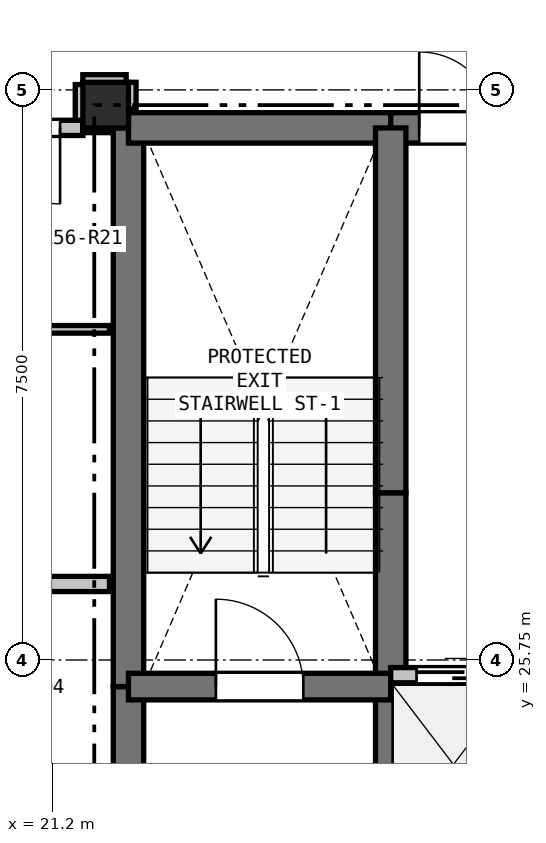
"""IFC4 building model, lengths in metres.
Left out: names, types, materials, properties, quantities, classifications, styles, units other than length and angle.
Written with IfcOpenShell. Run it as: python <this file> out.ifc"""

import sys

from ifc_helpers import new_model, si_unit, direction, frame, frame_2d, origin, origin_2d, place, context, subcontext, project, spatial, rectangle, extrude, element, fill, save


model = new_model("IFC4")
c1 = context("Model", 3, precision=1e-05, world=origin(), true_north=direction((0.0, 1.0)))
c2 = subcontext(c1, "Body", "Model", "MODEL_VIEW")
j1 = project(units=[si_unit("LENGTHUNIT", "METRE"), si_unit("PLANEANGLEUNIT", "RADIAN")], contexts=[c1])
p1 = place(None, origin())
s1 = spatial("IfcSite", under=j1, at=p1, CompositionType="ELEMENT")
p2 = place(p1, origin())
s2 = spatial("IfcBuilding", under=s1, at=p2, CompositionType="ELEMENT")
p3 = place(p2, frame((0.0, 0.0, 201.9)))
s3 = spatial("IfcBuildingStorey", under=s2, at=p3, CompositionType="ELEMENT", Elevation=201.9)
p4 = place(p3, frame((21.9, 33.05, 0.0), z_axis=(0.0, 0.0, 1.0), x_axis=(1.0, 0.0, 0.0)))
e1 = element("IfcColumn", 1, at=p4, inside=s3, PredefinedType="COLUMN", context=c2, shape_type="SweptSolid", body=[
    extrude(rectangle(XDim=0.6, YDim=0.6, at=origin_2d()), origin(), (0.0, 0.0, 1.0), 3.3),
])
p5 = place(p3, frame((22.2, 20.75, 0.0), z_axis=(0.0, 0.0, 1.0), x_axis=(0.0, 1.0, 0.0)))
e2 = element("IfcWall", 2, at=p5, inside=s3, PredefinedType="SHEAR", context=c2, shape_type="SweptSolid", body=[
    extrude(rectangle(XDim=4.65, YDim=0.4, at=frame_2d((2.325, 0.0))), origin(), (0.0, 0.0, 1.0), 3.07),
])
p6 = place(p3, frame((22.2, 25.4, 0.0), z_axis=(0.0, 0.0, 1.0), x_axis=(0.0, 1.0, 0.0)))
e3 = element("IfcWall", 3, at=p6, inside=s3, PredefinedType="SHEAR", context=c2, shape_type="SweptSolid", body=[
    extrude(rectangle(XDim=7.35, YDim=0.4, at=frame_2d((3.675, 0.0))), origin(), (0.0, 0.0, 1.0), 3.07),
])
p7 = place(p3, frame((22.2, 32.75, 0.0), z_axis=(0.0, 0.0, 1.0), x_axis=(1.0, 0.0, 0.0)))
e4 = element("IfcWall", 4, at=p7, inside=s3, PredefinedType="SHEAR", context=c2, shape_type="SweptSolid", body=[
    extrude(rectangle(XDim=3.45, YDim=0.4, at=frame_2d((1.725, 0.0))), origin(), (0.0, 0.0, 1.0), 3.07),
])
p8 = place(p3, frame((25.65, 32.75, 0.0), z_axis=(0.0, 0.0, 1.0), x_axis=(1.0, 0.0, 0.0)))
e5 = element("IfcWall", 5, at=p8, inside=s3, PredefinedType="SHEAR", context=c2, shape_type="SweptSolid", body=[
    extrude(rectangle(XDim=1.75, YDim=0.4, at=frame_2d((0.875, 0.0))), origin(), (0.0, 0.0, 1.0), 3.07),
])
p9 = place(p8, frame((0.375, 0.0, 0.0)))
e6 = element("IfcOpeningElement", 6, at=p9, cuts=e5, PredefinedType="OPENING", context=c2, shape_type="SweptSolid", body=[
    extrude(rectangle(XDim=1.0, YDim=2.15, at=frame_2d((0.5, 1.075))), frame((0.0, 0.21, 0.0), z_axis=(0.0, -1.0, 0.0), x_axis=(1.0, 0.0, 0.0)), (0.0, 0.0, 1.0), 0.42),
])
p10 = place(p3, frame((25.65, 22.75, 0.0), z_axis=(0.0, 0.0, 1.0), x_axis=(0.0, 1.0, 0.0)))
e7 = element("IfcWall", 7, at=p10, inside=s3, PredefinedType="SHEAR", context=c2, shape_type="SweptSolid", body=[
    extrude(rectangle(XDim=2.8, YDim=0.4, at=frame_2d((1.4, 0.0))), origin(), (0.0, 0.0, 1.0), 3.07),
])
p11 = place(p3, frame((25.65, 25.55, 0.0), z_axis=(0.0, 0.0, 1.0), x_axis=(0.0, 1.0, 0.0)))
e8 = element("IfcWall", 8, at=p11, inside=s3, PredefinedType="SHEAR", context=c2, shape_type="SweptSolid", body=[
    extrude(rectangle(XDim=2.4, YDim=0.4, at=frame_2d((1.2, 0.0))), origin(), (0.0, 0.0, 1.0), 3.07),
])
p12 = place(p3, frame((25.65, 27.95, 0.0), z_axis=(0.0, 0.0, 1.0), x_axis=(0.0, 1.0, 0.0)))
e9 = element("IfcWall", 9, at=p12, inside=s3, PredefinedType="SHEAR", context=c2, shape_type="SweptSolid", body=[
    extrude(rectangle(XDim=4.8, YDim=0.4, at=frame_2d((2.4, 0.0))), origin(), (0.0, 0.0, 1.0), 3.07),
])
p13 = place(p3, frame((22.2, 25.4, 0.0), z_axis=(0.0, 0.0, 1.0), x_axis=(1.0, 0.0, 0.0)))
e10 = element("IfcWall", 10, at=p13, inside=s3, PredefinedType="SHEAR", context=c2, shape_type="SweptSolid", body=[
    extrude(rectangle(XDim=3.45, YDim=0.35, at=frame_2d((1.725, 0.0))), origin(), (0.0, 0.0, 1.0), 3.07),
])
p14 = place(p13, frame((1.15, 0.0, 0.0)))
e11 = element("IfcOpeningElement", 11, at=p14, cuts=e10, PredefinedType="OPENING", context=c2, shape_type="SweptSolid", body=[
    extrude(rectangle(XDim=1.15, YDim=2.15, at=frame_2d((0.575, 1.075))), frame((0.0, 0.185, 0.0), z_axis=(0.0, -1.0, 0.0), x_axis=(1.0, 0.0, 0.0)), (0.0, 0.0, 1.0), 0.37),
])
p15 = place(p3, frame((25.65, 25.55, 0.0), z_axis=(0.0, 0.0, 1.0), x_axis=(1.0, 0.0, 0.0)))
e12 = element("IfcWall", 12, at=p15, inside=s3, PredefinedType="PARTITIONING", context=c2, shape_type="SweptSolid", body=[
    extrude(rectangle(XDim=4.95, YDim=0.2, at=frame_2d((2.475, 0.0))), origin(), (0.0, 0.0, 1.0), 3.07),
])
p16 = place(p15, frame((0.34, 0.0, 0.0)))
e13 = element("IfcOpeningElement", 13, at=p16, cuts=e12, PredefinedType="OPENING", context=c2, shape_type="SweptSolid", body=[
    extrude(rectangle(XDim=1.1, YDim=2.15, at=frame_2d((0.55, 1.075))), frame((0.0, 0.11, 0.0), z_axis=(0.0, -1.0, 0.0), x_axis=(1.0, 0.0, 0.0)), (0.0, 0.0, 1.0), 0.22),
])
p17 = place(p15, frame((1.99, 0.0, 0.0)))
e14 = element("IfcOpeningElement", 14, at=p17, cuts=e12, PredefinedType="OPENING", context=c2, shape_type="SweptSolid", body=[
    extrude(rectangle(XDim=1.1, YDim=2.15, at=frame_2d((0.55, 1.075))), frame((0.0, 0.11, 0.0), z_axis=(0.0, -1.0, 0.0), x_axis=(1.0, 0.0, 0.0)), (0.0, 0.0, 1.0), 0.22),
])
p18 = place(p15, frame((3.64, 0.0, 0.0)))
e15 = element("IfcOpeningElement", 15, at=p18, cuts=e12, PredefinedType="OPENING", context=c2, shape_type="SweptSolid", body=[
    extrude(rectangle(XDim=1.1, YDim=2.15, at=frame_2d((0.55, 1.075))), frame((0.0, 0.11, 0.0), z_axis=(0.0, -1.0, 0.0), x_axis=(1.0, 0.0, 0.0)), (0.0, 0.0, 1.0), 0.22),
])
p19 = place(p3, frame((22.2, 33.0, 0.0), z_axis=(0.0, 0.0, 1.0), x_axis=(0.0, 1.0, 0.0)))
e16 = element("IfcWall", 16, at=p19, inside=s3, PredefinedType="PARTITIONING", context=c2, shape_type="SweptSolid", body=[
    extrude(rectangle(XDim=0.35, YDim=0.2, at=frame_2d((0.175, 0.0))), origin(), (0.0, 0.0, 1.0), 2.595),
])
p20 = place(p3, frame((22.17, 33.35, 0.0), z_axis=(0.0, 0.0, 1.0), x_axis=(-1.0, 0.0, 0.0)))
e17 = element("IfcWall", 17, at=p20, inside=s3, PredefinedType="PARTITIONING", context=c2, shape_type="SweptSolid", body=[
    extrude(rectangle(XDim=0.57, YDim=0.2, at=frame_2d((0.285, 0.0))), origin(), (0.0, 0.0, 1.0), 3.07),
])
p21 = place(p3, frame((21.6, 33.32, 0.0), z_axis=(0.0, 0.0, 1.0), x_axis=(0.0, -1.0, 0.0)))
e18 = element("IfcWall", 18, at=p21, inside=s3, PredefinedType="PARTITIONING", context=c2, shape_type="SweptSolid", body=[
    extrude(rectangle(XDim=0.57, YDim=0.2, at=frame_2d((0.285, 0.0))), origin(), (0.0, 0.0, 1.0), 2.518),
])
p22 = place(p3, frame((21.6, 32.75, 0.0), z_axis=(0.0, 0.0, 1.0), x_axis=(-1.0, 0.0, 0.0)))
e19 = element("IfcWall", 19, at=p22, inside=s3, PredefinedType="PARTITIONING", context=c2, shape_type="SweptSolid", body=[
    extrude(rectangle(XDim=1.6, YDim=0.2, at=frame_2d((0.8, 0.0))), origin(), (0.0, 0.0, 1.0), 2.518),
])
p23 = place(p22, frame((0.3, 0.0, 0.0)))
e20 = element("IfcOpeningElement", 20, at=p23, cuts=e19, PredefinedType="OPENING", context=c2, shape_type="SweptSolid", body=[
    extrude(rectangle(XDim=1.0, YDim=2.15, at=frame_2d((0.5, 1.075))), frame((0.0, 0.11, 0.0), z_axis=(0.0, -1.0, 0.0), x_axis=(1.0, 0.0, 0.0)), (0.0, 0.0, 1.0), 0.22),
])
p24 = place(p3, frame((21.6, 32.75, 0.0), z_axis=(0.0, 0.0, 1.0), x_axis=(1.0, 0.0, 0.0)))
e21 = element("IfcWall", 21, at=p24, inside=s3, PredefinedType="PARTITIONING", context=c2, shape_type="SweptSolid", body=[
    extrude(rectangle(XDim=0.35, YDim=0.125, at=frame_2d((0.175, 0.0))), origin(), (0.0, 0.0, 1.0), 2.595),
])
p25 = place(p3, frame((21.95, 30.1, 0.0), z_axis=(0.0, 0.0, 1.0), x_axis=(-1.0, 0.0, 0.0)))
e22 = element("IfcWall", 22, at=p25, inside=s3, PredefinedType="PARTITIONING", context=c2, shape_type="SweptSolid", body=[
    extrude(rectangle(XDim=2.75, YDim=0.1, at=frame_2d((1.375, 0.0))), origin(), (0.0, 0.0, 1.0), 2.595),
])
p26 = place(p25, frame((0.9, 0.0, 0.0)))
e23 = element("IfcOpeningElement", 23, at=p26, cuts=e22, PredefinedType="OPENING", context=c2, shape_type="SweptSolid", body=[
    extrude(rectangle(XDim=0.95, YDim=2.1, at=frame_2d((0.475, 1.05))), frame((0.0, 0.06, 0.0), z_axis=(0.0, -1.0, 0.0), x_axis=(1.0, 0.0, 0.0)), (0.0, 0.0, 1.0), 0.12),
])
p27 = place(p3, frame((16.5, 26.75, 0.0), z_axis=(0.0, 0.0, 1.0), x_axis=(1.0, 0.0, 0.0)))
e24 = element("IfcWall", 24, at=p27, inside=s3, PredefinedType="PARTITIONING", context=c2, shape_type="SweptSolid", body=[
    extrude(rectangle(XDim=5.45, YDim=0.2, at=frame_2d((2.725, 0.0))), origin(), (0.0, 0.0, 1.0), 2.595),
])
p28 = place(p16, origin())
e25 = element("IfcDoor", 25, at=p28, inside=s3, OperationType="SLIDING_TO_LEFT", PredefinedType="DOOR", context=c2, shape_type="SweptSolid", body=[
    extrude(rectangle(XDim=1.1, YDim=2.15, at=frame_2d((0.55, 1.075))), frame((0.0, 0.025, 0.0), z_axis=(0.0, -1.0, 0.0), x_axis=(1.0, 0.0, 0.0)), (0.0, 0.0, 1.0), 0.05),
])
fill(e13, e25)
p29 = place(p9, origin())
e26 = element("IfcDoor", 26, at=p29, inside=s3, OperationType="SINGLE_SWING_LEFT", PredefinedType="DOOR", context=c2, shape_type="SweptSolid", body=[
    extrude(rectangle(XDim=1.0, YDim=2.15, at=frame_2d((0.5, 1.075))), frame((0.0, 0.025, 0.0), z_axis=(0.0, -1.0, 0.0), x_axis=(1.0, 0.0, 0.0)), (0.0, 0.0, 1.0), 0.05),
])
fill(e6, e26)
p30 = place(p14, origin())
e27 = element("IfcDoor", 27, at=p30, inside=s3, OperationType="SINGLE_SWING_LEFT", PredefinedType="DOOR", context=c2, shape_type="SweptSolid", body=[
    extrude(rectangle(XDim=1.15, YDim=2.15, at=frame_2d((0.575, 1.075))), frame((0.0, 0.025, 0.0), z_axis=(0.0, -1.0, 0.0), x_axis=(1.0, 0.0, 0.0)), (0.0, 0.0, 1.0), 0.05),
])
fill(e11, e27)
p31 = place(p23, origin())
e28 = element("IfcDoor", 28, at=p31, inside=s3, OperationType="SINGLE_SWING_LEFT", PredefinedType="DOOR", context=c2, shape_type="SweptSolid", body=[
    extrude(rectangle(XDim=1.0, YDim=2.15, at=frame_2d((0.5, 1.075))), frame((0.0, 0.025, 0.0), z_axis=(0.0, -1.0, 0.0), x_axis=(1.0, 0.0, 0.0)), (0.0, 0.0, 1.0), 0.05),
])
fill(e20, e28)
save(model, sys.argv[1])
